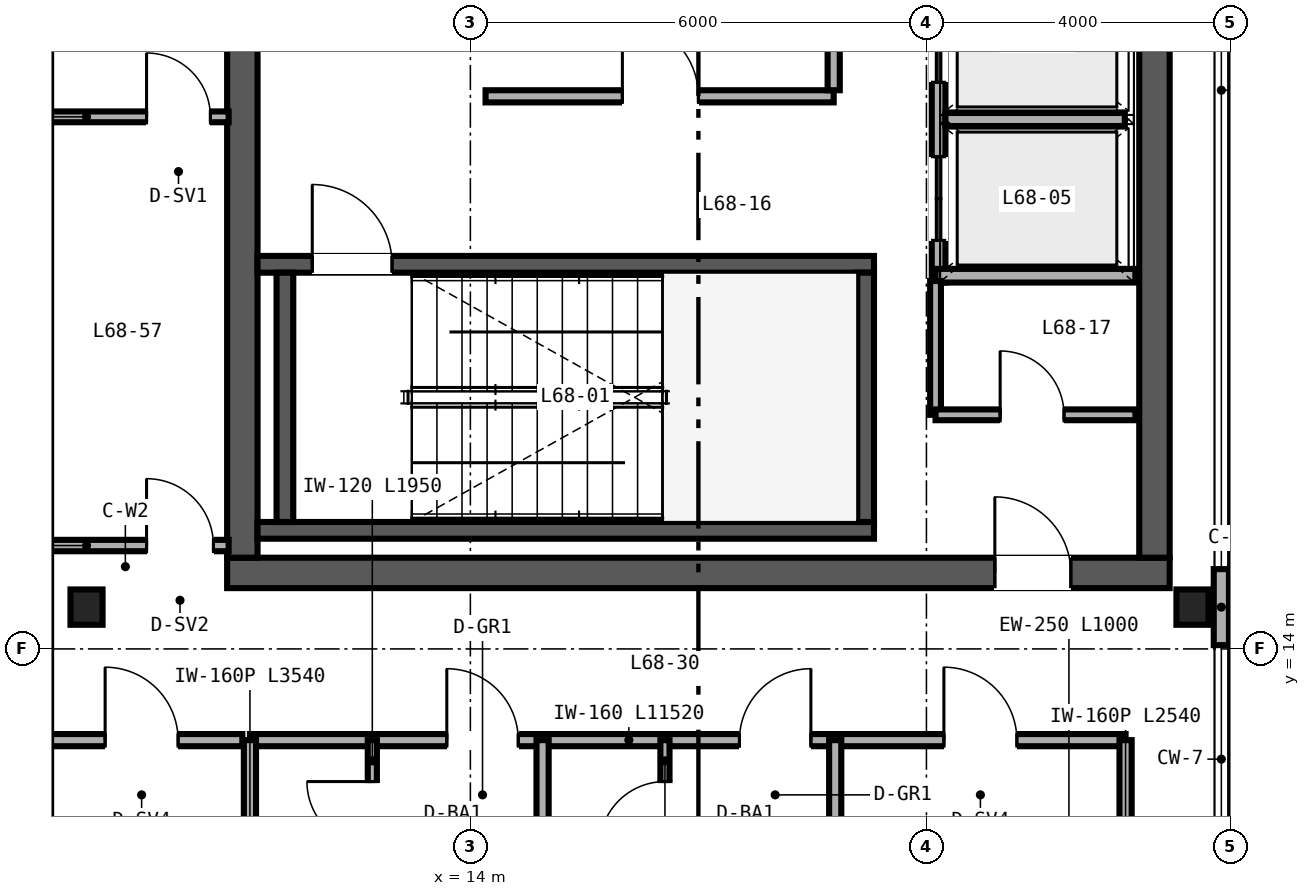
"""IFC4 building model, lengths in metres.
Left out: names, types, materials, properties, quantities, classifications, styles, units other than length and angle.
Written with IfcOpenShell. Run it as: python <this file> out.ifc"""

import sys

from ifc_helpers import new_model, si_unit, direction, frame, frame_2d, origin, origin_2d, place, context, subcontext, project, spatial, rectangle, i_section, extrude, source, transform, mapped, element, fill, save


model = new_model("IFC4")
c1 = context("Model", 3, precision=1e-05, world=origin(), true_north=direction((0.0, 1.0)))
c2 = subcontext(c1, "Body", "Model", "MODEL_VIEW")
j1 = project(units=[si_unit("LENGTHUNIT", "METRE"), si_unit("PLANEANGLEUNIT", "RADIAN")], contexts=[c1])
p1 = place(None, origin())
s1 = spatial("IfcSite", under=j1, at=p1, CompositionType="ELEMENT")
p2 = place(p1, origin())
s2 = spatial("IfcBuilding", under=s1, at=p2, CompositionType="ELEMENT")
p3 = place(p2, frame((0.0, 0.0, 268.8)))
s3 = spatial("IfcBuildingStorey", under=s2, at=p3, CompositionType="ELEMENT", Elevation=268.8)
p4 = place(p3, frame((10.8, 15.0, 0.0), z_axis=(0.0, 0.0, 1.0), x_axis=(1.0, 0.0, 0.0)))
e1 = element("IfcWall", 1, at=p4, inside=s3, PredefinedType="SHEAR", context=c2, shape_type="SweptSolid", body=[
    extrude(rectangle(XDim=12.4, YDim=0.4, at=frame_2d((6.2, 0.0))), origin(), (0.0, 0.0, 1.0), 3.28),
])
p5 = place(p4, frame((10.1, 0.0, 0.0)))
e2 = element("IfcOpeningElement", 2, at=p5, cuts=e1, PredefinedType="OPENING", context=c2, shape_type="SweptSolid", body=[
    extrude(rectangle(XDim=1.0, YDim=2.15, at=frame_2d((0.5, 1.075))), frame((0.0, 0.21, 0.0), z_axis=(0.0, -1.0, 0.0), x_axis=(1.0, 0.0, 0.0)), (0.0, 0.0, 1.0), 0.42),
])
for number, where, z_axis, x_axis in (
    (3, (11.0, 15.2, 0.0), (0.0, 0.0, 1.0), (0.0, 1.0, 0.0)),
    (4, (23.0, 15.2, 0.0), (0.0, 0.0, 1.0), (0.0, 1.0, 0.0)),
):
    element("IfcWall", number, at=place(p3, frame(where, z_axis=z_axis, x_axis=x_axis)), inside=s3, PredefinedType="SHEAR", context=c2, shape_type="SweptSolid", body=[
        extrude(rectangle(XDim=21.6, YDim=0.4, at=frame_2d((10.8, 0.0))), origin(), (0.0, 0.0, 1.0), 3.28),
    ])
p6 = place(p3, frame((11.2, 15.56, 0.0), z_axis=(0.0, 0.0, 1.0), x_axis=(1.0, 0.0, 0.0)))
e5 = element("IfcWall", 5, at=p6, inside=s3, PredefinedType="SHEAR", context=c2, shape_type="SweptSolid", body=[
    extrude(rectangle(XDim=8.11, YDim=0.22, at=frame_2d((4.055, 0.0))), origin(), (0.0, 0.0, 1.0), 3.4),
])
p7 = place(p3, frame((11.2, 19.06, 0.0), z_axis=(0.0, 0.0, 1.0), x_axis=(1.0, 0.0, 0.0)))
e6 = element("IfcWall", 6, at=p7, inside=s3, PredefinedType="SHEAR", context=c2, shape_type="SweptSolid", body=[
    extrude(rectangle(XDim=8.11, YDim=0.22, at=frame_2d((4.055, 0.0))), origin(), (0.0, 0.0, 1.0), 3.4),
])
p8 = place(p7, frame((0.72, 0.0, 0.0)))
e7 = element("IfcOpeningElement", 7, at=p8, cuts=e6, PredefinedType="OPENING", context=c2, shape_type="SweptSolid", body=[
    extrude(rectangle(XDim=1.05, YDim=2.15, at=frame_2d((0.525, 1.075))), frame((0.0, 0.12, 0.0), z_axis=(0.0, -1.0, 0.0), x_axis=(1.0, 0.0, 0.0)), (0.0, 0.0, 1.0), 0.24),
])
for number, where, z_axis, x_axis in (
    (8, (11.56, 15.67, 0.0), (0.0, 0.0, 1.0), (0.0, 1.0, 0.0)),
    (9, (19.2, 15.67, 0.0), (0.0, 0.0, 1.0), (0.0, 1.0, 0.0)),
):
    element("IfcWall", number, at=place(p3, frame(where, z_axis=z_axis, x_axis=x_axis)), inside=s3, PredefinedType="SHEAR", context=c2, shape_type="SweptSolid", body=[
        extrude(rectangle(XDim=3.28, YDim=0.22, at=frame_2d((1.64, 0.0))), origin(), (0.0, 0.0, 1.0), 3.4),
    ])
m1 = source(origin(), c2, "Body", "SweptSolid", [
    extrude(i_section(OverallWidth=0.422, OverallDepth=0.465, WebThickness=0.045, FlangeThickness=0.073, FilletRadius=0.025, at=origin_2d()), origin(), (0.0, 0.0, 1.0), 3.28),
])
for number, where, z_axis, x_axis in (
    (10, (8.95, 14.55, 0.0), (0.0, 0.0, 1.0), (1.0, 0.0, 0.0)),
    (11, (23.5, 14.55, 0.0), (0.0, 0.0, 1.0), (1.0, 0.0, 0.0)),
):
    element("IfcColumn", number, at=place(p3, frame(where, z_axis=z_axis, x_axis=x_axis)), inside=s3, PredefinedType="COLUMN", context=c2, shape_type="MappedRepresentation", body=[
        mapped(m1, transform((0.0, 0.0, 0.0), scale=1.0)),
    ])
p9 = place(p3, frame((23.88, 14.05, 0.0), z_axis=(0.0, 0.0, 1.0), x_axis=(0.0, 1.0, 0.0)))
e12 = element("IfcWall", 12, at=p9, inside=s3, PredefinedType="PARAPET", context=c2, shape_type="SweptSolid", body=[
    extrude(rectangle(XDim=1.0, YDim=0.2, at=frame_2d((0.5, 0.0))), origin(), (0.0, 0.0, 1.0), 1.73),
])
p10 = place(p3, frame((20.16, 18.82, 0.0), z_axis=(0.0, 0.0, 1.0), x_axis=(0.0, 1.0, 0.0)))
e13 = element("IfcWall", 13, at=p10, inside=s3, PredefinedType="SOLIDWALL", context=c2, shape_type="SweptSolid", body=[
    extrude(rectangle(XDim=6.32, YDim=0.18, at=frame_2d((3.16, 0.0))), origin(), (0.0, 0.0, 1.0), 2.38),
])
p11 = place(p10, frame((0.555, 0.0, 0.0)))
e14 = element("IfcOpeningElement", 14, at=p11, cuts=e13, PredefinedType="OPENING", context=c2, shape_type="SweptSolid", body=[
    extrude(rectangle(XDim=1.1, YDim=2.2, at=frame_2d((0.55, 1.1))), frame((0.0, 0.1, 0.0), z_axis=(0.0, -1.0, 0.0), x_axis=(1.0, 0.0, 0.0)), (0.0, 0.0, 1.0), 0.2),
])
p12 = place(p10, frame((2.635, 0.0, 0.0)))
e15 = element("IfcOpeningElement", 15, at=p12, cuts=e13, PredefinedType="OPENING", context=c2, shape_type="SweptSolid", body=[
    extrude(rectangle(XDim=1.1, YDim=2.2, at=frame_2d((0.55, 1.1))), frame((0.0, 0.1, 0.0), z_axis=(0.0, -1.0, 0.0), x_axis=(1.0, 0.0, 0.0)), (0.0, 0.0, 1.0), 0.2),
])
p13 = place(p10, frame((4.69, 0.0, 0.0)))
e16 = element("IfcOpeningElement", 16, at=p13, cuts=e13, PredefinedType="OPENING", context=c2, shape_type="SweptSolid", body=[
    extrude(rectangle(XDim=1.1, YDim=2.2, at=frame_2d((0.55, 1.1))), frame((0.0, 0.1, 0.0), z_axis=(0.0, -1.0, 0.0), x_axis=(1.0, 0.0, 0.0)), (0.0, 0.0, 1.0), 0.2),
])
p14 = place(p3, frame((20.12, 18.91, 0.0), z_axis=(0.0, 0.0, 1.0), x_axis=(1.0, 0.0, 0.0)))
e17 = element("IfcWall", 17, at=p14, inside=s3, PredefinedType="SOLIDWALL", context=c2, shape_type="SweptSolid", body=[
    extrude(rectangle(XDim=2.63, YDim=0.18, at=frame_2d((1.315, 0.0))), origin(), (0.0, 0.0, 1.0), 3.28),
])
p15 = place(p3, frame((20.25, 20.965, 0.0), z_axis=(0.0, 0.0, 1.0), x_axis=(1.0, 0.0, 0.0)))
e18 = element("IfcWall", 18, at=p15, inside=s3, PredefinedType="SOLIDWALL", context=c2, shape_type="SweptSolid", body=[
    extrude(rectangle(XDim=2.36, YDim=0.18, at=frame_2d((1.18, 0.0))), origin(), (0.0, 0.0, 1.0), 2.38),
])
p16 = place(p3, frame((14.2, 21.27, 0.0), z_axis=(0.0, 0.0, 1.0), x_axis=(1.0, 0.0, 0.0)))
e19 = element("IfcWall", 19, at=p16, inside=s3, PredefinedType="PARTITIONING", context=c2, shape_type="SweptSolid", body=[
    extrude(rectangle(XDim=4.58, YDim=0.16, at=frame_2d((2.29, 0.0))), origin(), (0.0, 0.0, 1.0), 3.28),
])
p17 = place(p16, frame((1.8, 0.0, 0.0)))
e20 = element("IfcOpeningElement", 20, at=p17, cuts=e19, PredefinedType="OPENING", context=c2, shape_type="SweptSolid", body=[
    extrude(rectangle(XDim=1.0, YDim=2.15, at=frame_2d((0.5, 1.075))), frame((0.0, 0.09, 0.0), z_axis=(0.0, -1.0, 0.0), x_axis=(1.0, 0.0, 0.0)), (0.0, 0.0, 1.0), 0.18),
])
p18 = place(p3, frame((18.78, 21.35, 0.0), z_axis=(0.0, 0.0, 1.0), x_axis=(0.0, 1.0, 0.0)))
e21 = element("IfcWall", 21, at=p18, inside=s3, PredefinedType="PARTITIONING", context=c2, shape_type="SweptSolid", body=[
    extrude(rectangle(XDim=3.81, YDim=0.16, at=frame_2d((1.905, 0.0))), origin(), (0.0, 0.0, 1.0), 3.28),
])
p19 = place(p3, frame((20.12, 17.08, 0.0), z_axis=(0.0, 0.0, 1.0), x_axis=(0.0, 1.0, 0.0)))
e22 = element("IfcWall", 22, at=p19, inside=s3, PredefinedType="PARTITIONING", context=c2, shape_type="SweptSolid", body=[
    extrude(rectangle(XDim=1.76, YDim=0.142, at=frame_2d((0.88, 0.0))), origin(), (0.0, 0.0, 1.0), 3.28),
])
p20 = place(p3, frame((20.12, 17.08, 0.0), z_axis=(0.0, 0.0, 1.0), x_axis=(1.0, 0.0, 0.0)))
e23 = element("IfcWall", 23, at=p20, inside=s3, PredefinedType="PARTITIONING", context=c2, shape_type="SweptSolid", body=[
    extrude(rectangle(XDim=2.63, YDim=0.142, at=frame_2d((1.315, 0.0))), origin(), (0.0, 0.0, 1.0), 3.28),
])
p21 = place(p20, frame((0.85, 0.0, 0.0)))
e24 = element("IfcOpeningElement", 24, at=p21, cuts=e23, PredefinedType="OPENING", context=c2, shape_type="SweptSolid", body=[
    extrude(rectangle(XDim=0.84, YDim=2.1, at=frame_2d((0.42, 1.05))), frame((0.0, 0.081, 0.0), z_axis=(0.0, -1.0, 0.0), x_axis=(1.0, 0.0, 0.0)), (0.0, 0.0, 1.0), 0.162),
])
p22 = place(p3, frame((11.1, 12.8, 0.0), z_axis=(0.0, 0.0, 1.0), x_axis=(1.0, 0.0, 0.0)))
e25 = element("IfcWall", 25, at=p22, inside=s3, PredefinedType="PARTITIONING", context=c2, shape_type="SweptSolid", body=[
    extrude(rectangle(XDim=11.52, YDim=0.16, at=frame_2d((5.76, 0.0))), origin(), (0.0, 0.0, 1.0), 3.28),
])
p23 = place(p22, frame((2.59, 0.0, 0.0)))
e26 = element("IfcOpeningElement", 26, at=p23, cuts=e25, PredefinedType="OPENING", context=c2, shape_type="SweptSolid", body=[
    extrude(rectangle(XDim=0.94, YDim=2.15, at=frame_2d((0.47, 1.075))), frame((0.0, 0.09, 0.0), z_axis=(0.0, -1.0, 0.0), x_axis=(1.0, 0.0, 0.0)), (0.0, 0.0, 1.0), 0.18),
])
p24 = place(p22, frame((6.44, 0.0, 0.0)))
e27 = element("IfcOpeningElement", 27, at=p24, cuts=e25, PredefinedType="OPENING", context=c2, shape_type="SweptSolid", body=[
    extrude(rectangle(XDim=0.94, YDim=2.15, at=frame_2d((0.47, 1.075))), frame((0.0, 0.09, 0.0), z_axis=(0.0, -1.0, 0.0), x_axis=(1.0, 0.0, 0.0)), (0.0, 0.0, 1.0), 0.18),
])
p25 = place(p22, frame((9.13, 0.0, 0.0)))
e28 = element("IfcOpeningElement", 28, at=p25, cuts=e25, PredefinedType="OPENING", context=c2, shape_type="SweptSolid", body=[
    extrude(rectangle(XDim=0.96, YDim=2.15, at=frame_2d((0.48, 1.075))), frame((0.0, 0.09, 0.0), z_axis=(0.0, -1.0, 0.0), x_axis=(1.0, 0.0, 0.0)), (0.0, 0.0, 1.0), 0.18),
])
p26 = place(p3, frame((11.1, 9.26, 0.0), z_axis=(0.0, 0.0, 1.0), x_axis=(0.0, 1.0, 0.0)))
e29 = element("IfcWall", 29, at=p26, inside=s3, PredefinedType="PARTITIONING", context=c2, shape_type="SweptSolid", body=[
    extrude(rectangle(XDim=3.54, YDim=0.16, at=frame_2d((1.77, 0.0))), origin(), (0.0, 0.0, 1.0), 3.28),
])
p27 = place(p3, frame((22.62, 10.26, 0.0), z_axis=(0.0, 0.0, 1.0), x_axis=(0.0, 1.0, 0.0)))
e30 = element("IfcWall", 30, at=p27, inside=s3, PredefinedType="PARTITIONING", context=c2, shape_type="SweptSolid", body=[
    extrude(rectangle(XDim=2.54, YDim=0.16, at=frame_2d((1.27, 0.0))), origin(), (0.0, 0.0, 1.0), 3.28),
])
p28 = place(p3, frame((14.95, 8.36, 0.0), z_axis=(0.0, 0.0, 1.0), x_axis=(0.0, 1.0, 0.0)))
e31 = element("IfcWall", 31, at=p28, inside=s3, PredefinedType="PARTITIONING", context=c2, shape_type="SweptSolid", body=[
    extrude(rectangle(XDim=4.44, YDim=0.16, at=frame_2d((2.22, 0.0))), origin(), (0.0, 0.0, 1.0), 2.587),
])
p29 = place(p3, frame((12.71, 10.85, 0.0), z_axis=(0.0, 0.0, 1.0), x_axis=(0.0, 1.0, 0.0)))
e32 = element("IfcWall", 32, at=p29, inside=s3, PredefinedType="PARTITIONING", context=c2, shape_type="SweptSolid", body=[
    extrude(rectangle(XDim=1.95, YDim=0.12, at=frame_2d((0.975, 0.0))), origin(), (0.0, 0.0, 1.0), 3.28),
])
p30 = place(p29, frame((0.545, 0.0, 0.0)))
e33 = element("IfcOpeningElement", 33, at=p30, cuts=e32, PredefinedType="OPENING", context=c2, shape_type="SweptSolid", body=[
    extrude(rectangle(XDim=0.86, YDim=2.1, at=frame_2d((0.43, 1.05))), frame((0.0, 0.07, 0.0), z_axis=(0.0, -1.0, 0.0), x_axis=(1.0, 0.0, 0.0)), (0.0, 0.0, 1.0), 0.14),
])
p31 = place(p3, frame((18.8, 8.36, 0.0), z_axis=(0.0, 0.0, 1.0), x_axis=(0.0, 1.0, 0.0)))
e34 = element("IfcWall", 34, at=p31, inside=s3, PredefinedType="PARTITIONING", context=c2, shape_type="SweptSolid", body=[
    extrude(rectangle(XDim=4.44, YDim=0.16, at=frame_2d((2.22, 0.0))), origin(), (0.0, 0.0, 1.0), 2.587),
])
p32 = place(p3, frame((16.56, 10.85, 0.0), z_axis=(0.0, 0.0, 1.0), x_axis=(0.0, 1.0, 0.0)))
e35 = element("IfcWall", 35, at=p32, inside=s3, PredefinedType="PARTITIONING", context=c2, shape_type="SweptSolid", body=[
    extrude(rectangle(XDim=1.95, YDim=0.12, at=frame_2d((0.975, 0.0))), origin(), (0.0, 0.0, 1.0), 3.28),
])
p33 = place(p32, frame((0.545, 0.0, 0.0)))
e36 = element("IfcOpeningElement", 36, at=p33, cuts=e35, PredefinedType="OPENING", context=c2, shape_type="SweptSolid", body=[
    extrude(rectangle(XDim=0.86, YDim=2.1, at=frame_2d((0.43, 1.05))), frame((0.0, 0.07, 0.0), z_axis=(0.0, -1.0, 0.0), x_axis=(1.0, 0.0, 0.0)), (0.0, 0.0, 1.0), 0.14),
])
p34 = place(p3, frame((8.16, 15.36, 0.0), z_axis=(0.0, 0.0, 1.0), x_axis=(1.0, 0.0, 0.0)))
e37 = element("IfcWall", 37, at=p34, inside=s3, PredefinedType="PARTITIONING", context=c2, shape_type="SweptSolid", body=[
    extrude(rectangle(XDim=2.66, YDim=0.15, at=frame_2d((1.33, 0.0))), origin(), (0.0, 0.0, 1.0), 2.501),
])
p35 = place(p34, frame((1.58, 0.0, 0.0)))
e38 = element("IfcOpeningElement", 38, at=p35, cuts=e37, PredefinedType="OPENING", context=c2, shape_type="SweptSolid", body=[
    extrude(rectangle(XDim=0.88, YDim=2.15, at=frame_2d((0.44, 1.075))), frame((0.0, 0.085, 0.0), z_axis=(0.0, -1.0, 0.0), x_axis=(1.0, 0.0, 0.0)), (0.0, 0.0, 1.0), 0.17),
])
p36 = place(p3, frame((8.16, 21.0, 0.0), z_axis=(0.0, 0.0, 1.0), x_axis=(1.0, 0.0, 0.0)))
e39 = element("IfcWall", 39, at=p36, inside=s3, PredefinedType="PARTITIONING", context=c2, shape_type="SweptSolid", body=[
    extrude(rectangle(XDim=2.66, YDim=0.142, at=frame_2d((1.33, 0.0))), origin(), (0.0, 0.0, 1.0), 2.38),
])
p37 = place(p36, frame((1.58, 0.0, 0.0)))
e40 = element("IfcOpeningElement", 40, at=p37, cuts=e39, PredefinedType="OPENING", context=c2, shape_type="SweptSolid", body=[
    extrude(rectangle(XDim=0.84, YDim=2.1, at=frame_2d((0.42, 1.05))), frame((0.0, 0.081, 0.0), z_axis=(0.0, -1.0, 0.0), x_axis=(1.0, 0.0, 0.0)), (0.0, 0.0, 1.0), 0.162),
])
p38 = place(p3, frame((8.35, 12.8, 0.0), z_axis=(0.0, 0.0, 1.0), x_axis=(1.0, 0.0, 0.0)))
e41 = element("IfcWall", 41, at=p38, inside=s3, PredefinedType="PARTITIONING", context=c2, shape_type="SweptSolid", body=[
    extrude(rectangle(XDim=2.65, YDim=0.16, at=frame_2d((1.325, 0.0))), origin(), (0.0, 0.0, 1.0), 3.28),
])
p39 = place(p38, frame((0.845, 0.0, 0.0)))
e42 = element("IfcOpeningElement", 42, at=p39, cuts=e41, PredefinedType="OPENING", context=c2, shape_type="SweptSolid", body=[
    extrude(rectangle(XDim=0.96, YDim=2.15, at=frame_2d((0.48, 1.075))), frame((0.0, 0.09, 0.0), z_axis=(0.0, -1.0, 0.0), x_axis=(1.0, 0.0, 0.0)), (0.0, 0.0, 1.0), 0.18),
])
m2 = source(origin(), c2, "Body", "SweptSolid", [
    extrude(rectangle(XDim=1.05, YDim=2.15, at=frame_2d((0.525, 1.075))), frame((0.0, 0.025, 0.0), z_axis=(0.0, -1.0, 0.0), x_axis=(1.0, 0.0, 0.0)), (0.0, 0.0, 1.0), 0.05),
])
p40 = place(p8, origin())
e43 = element("IfcDoor", 43, at=p40, inside=s3, OperationType="SINGLE_SWING_LEFT", PredefinedType="DOOR", context=c2, shape_type="MappedRepresentation", body=[
    mapped(m2, transform((0.0, 0.0, 0.0), scale=1.0)),
])
fill(e7, e43)
m3 = source(origin(), c2, "Body", "SweptSolid", [
    extrude(rectangle(XDim=1.1, YDim=2.2, at=frame_2d((0.55, 1.1))), frame((0.0, 0.025, 0.0), z_axis=(0.0, -1.0, 0.0), x_axis=(1.0, 0.0, 0.0)), (0.0, 0.0, 1.0), 0.05),
])
p41 = place(p11, origin())
e44 = element("IfcDoor", 44, at=p41, inside=s3, OperationType="DOUBLE_DOOR_SLIDING", PredefinedType="DOOR", context=c2, shape_type="MappedRepresentation", body=[
    mapped(m3, transform((0.0, 0.0, 0.0), scale=1.0)),
])
fill(e14, e44)
p42 = place(p12, origin())
e45 = element("IfcDoor", 45, at=p42, inside=s3, OperationType="DOUBLE_DOOR_SLIDING", PredefinedType="DOOR", context=c2, shape_type="MappedRepresentation", body=[
    mapped(m3, transform((0.0, 0.0, 0.0), scale=1.0)),
])
fill(e15, e45)
m4 = source(origin(), c2, "Body", "SweptSolid", [
    extrude(rectangle(XDim=1.0, YDim=2.15, at=frame_2d((0.5, 1.075))), frame((0.0, 0.025, 0.0), z_axis=(0.0, -1.0, 0.0), x_axis=(1.0, 0.0, 0.0)), (0.0, 0.0, 1.0), 0.05),
])
p43 = place(p17, origin())
e46 = element("IfcDoor", 46, at=p43, inside=s3, OperationType="SINGLE_SWING_LEFT", PredefinedType="DOOR", context=c2, shape_type="MappedRepresentation", body=[
    mapped(m4, transform((0.0, 0.0, 0.0), scale=1.0)),
])
fill(e20, e46)
m5 = source(origin(), c2, "Body", "SweptSolid", [
    extrude(rectangle(XDim=0.84, YDim=2.1, at=frame_2d((0.42, 1.05))), frame((0.0, 0.025, 0.0), z_axis=(0.0, -1.0, 0.0), x_axis=(1.0, 0.0, 0.0)), (0.0, 0.0, 1.0), 0.05),
])
p44 = place(p21, origin())
e47 = element("IfcDoor", 47, at=p44, inside=s3, OperationType="SINGLE_SWING_LEFT", PredefinedType="DOOR", context=c2, shape_type="MappedRepresentation", body=[
    mapped(m5, transform((0.0, 0.0, 0.0), scale=1.0)),
])
fill(e24, e47)
p45 = place(p5, origin())
e48 = element("IfcDoor", 48, at=p45, inside=s3, OperationType="SINGLE_SWING_LEFT", PredefinedType="DOOR", context=c2, shape_type="MappedRepresentation", body=[
    mapped(m4, transform((0.0, 0.0, 0.0), scale=1.0)),
])
fill(e2, e48)
m6 = source(origin(), c2, "Body", "SweptSolid", [
    extrude(rectangle(XDim=0.86, YDim=2.1, at=frame_2d((0.43, 1.05))), frame((0.0, 0.025, 0.0), z_axis=(0.0, -1.0, 0.0), x_axis=(1.0, 0.0, 0.0)), (0.0, 0.0, 1.0), 0.05),
])
p46 = place(p30, origin())
e49 = element("IfcDoor", 49, at=p46, inside=s3, OperationType="SINGLE_SWING_RIGHT", PredefinedType="DOOR", context=c2, shape_type="MappedRepresentation", body=[
    mapped(m6, transform((0.0, 0.0, 0.0), scale=1.0)),
])
fill(e33, e49)
p47 = place(p33, origin())
e50 = element("IfcDoor", 50, at=p47, inside=s3, OperationType="SINGLE_SWING_LEFT", PredefinedType="DOOR", context=c2, shape_type="MappedRepresentation", body=[
    mapped(m6, transform((0.0, 0.0, 0.0), scale=1.0)),
])
fill(e36, e50)
m7 = source(origin(), c2, "Body", "SweptSolid", [
    extrude(rectangle(XDim=0.94, YDim=2.15, at=frame_2d((0.47, 1.075))), frame((0.0, 0.025, 0.0), z_axis=(0.0, -1.0, 0.0), x_axis=(1.0, 0.0, 0.0)), (0.0, 0.0, 1.0), 0.05),
])
p48 = place(p23, origin())
e51 = element("IfcDoor", 51, at=p48, inside=s3, OperationType="SINGLE_SWING_LEFT", PredefinedType="DOOR", context=c2, shape_type="MappedRepresentation", body=[
    mapped(m7, transform((0.0, 0.0, 0.0), scale=1.0)),
])
fill(e26, e51)
p49 = place(p24, origin())
e52 = element("IfcDoor", 52, at=p49, inside=s3, OperationType="SINGLE_SWING_RIGHT", PredefinedType="DOOR", context=c2, shape_type="MappedRepresentation", body=[
    mapped(m7, transform((0.0, 0.0, 0.0), scale=1.0)),
])
fill(e27, e52)
m8 = source(origin(), c2, "Body", "SweptSolid", [
    extrude(rectangle(XDim=0.96, YDim=2.15, at=frame_2d((0.48, 1.075))), frame((0.0, 0.025, 0.0), z_axis=(0.0, -1.0, 0.0), x_axis=(1.0, 0.0, 0.0)), (0.0, 0.0, 1.0), 0.05),
])
p50 = place(p25, origin())
e53 = element("IfcDoor", 53, at=p50, inside=s3, OperationType="SINGLE_SWING_LEFT", PredefinedType="DOOR", context=c2, shape_type="MappedRepresentation", body=[
    mapped(m8, transform((0.0, 0.0, 0.0), scale=1.0)),
])
fill(e28, e53)
m9 = source(origin(), c2, "Body", "SweptSolid", [
    extrude(rectangle(XDim=0.88, YDim=2.15, at=frame_2d((0.44, 1.075))), frame((0.0, 0.025, 0.0), z_axis=(0.0, -1.0, 0.0), x_axis=(1.0, 0.0, 0.0)), (0.0, 0.0, 1.0), 0.05),
])
p51 = place(p35, origin())
e54 = element("IfcDoor", 54, at=p51, inside=s3, OperationType="SINGLE_SWING_LEFT", PredefinedType="DOOR", context=c2, shape_type="MappedRepresentation", body=[
    mapped(m9, transform((0.0, 0.0, 0.0), scale=1.0)),
])
fill(e38, e54)
p52 = place(p37, origin())
e55 = element("IfcDoor", 55, at=p52, inside=s3, OperationType="SINGLE_SWING_LEFT", PredefinedType="DOOR", context=c2, shape_type="MappedRepresentation", body=[
    mapped(m5, transform((0.0, 0.0, 0.0), scale=1.0)),
])
fill(e40, e55)
p53 = place(p39, origin())
e56 = element("IfcDoor", 56, at=p53, inside=s3, OperationType="SINGLE_SWING_LEFT", PredefinedType="DOOR", context=c2, shape_type="MappedRepresentation", body=[
    mapped(m8, transform((0.0, 0.0, 0.0), scale=1.0)),
])
fill(e42, e56)
save(model, sys.argv[1])
